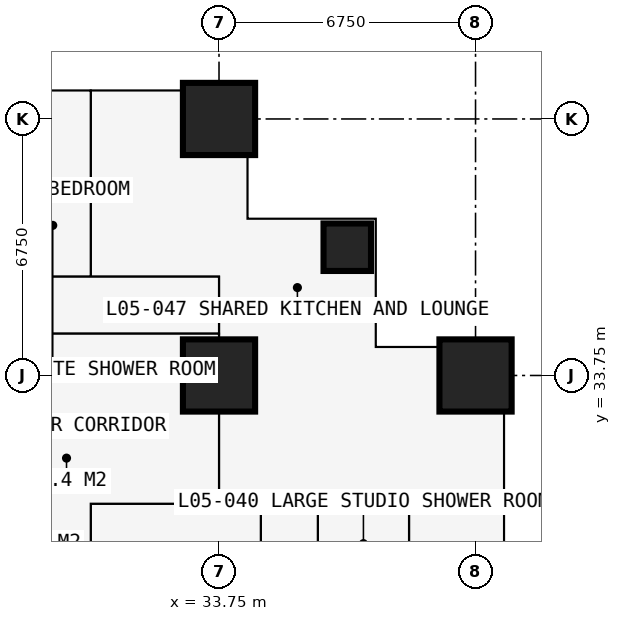
"""IFC4 building model, lengths in metres.
Left out: names, types, materials, properties, quantities, classifications, styles, units other than length and angle.
Written with IfcOpenShell. Run it as: python <this file> out.ifc"""

import sys

from ifc_helpers import new_model, si_unit, direction, frame, frame_2d, origin, origin_2d, place, context, subcontext, project, spatial, rectangle, extrude, element, fill, save


model = new_model("IFC4")
c1 = context("Model", 3, precision=1e-05, world=origin(), true_north=direction((0.0, 1.0)))
c2 = subcontext(c1, "Body", "Model", "MODEL_VIEW")
j1 = project(units=[si_unit("LENGTHUNIT", "METRE"), si_unit("PLANEANGLEUNIT", "RADIAN")], contexts=[c1])
p1 = place(None, origin())
s1 = spatial("IfcSite", under=j1, at=p1, CompositionType="ELEMENT")
p2 = place(p1, origin())
s2 = spatial("IfcBuilding", under=s1, at=p2, CompositionType="ELEMENT")
p3 = place(p2, frame((0.0, 0.0, 21.6)))
s3 = spatial("IfcBuildingStorey", under=s2, at=p3, CompositionType="ELEMENT", Elevation=21.6)
for number, where, z_axis, x_axis in (
    (1, (33.75, 33.75, 0.0), (0.0, 0.0, 1.0), (1.0, 0.0, 0.0)),
    (2, (33.75, 40.5, 0.0), (0.0, 0.0, 1.0), (1.0, 0.0, 0.0)),
):
    element("IfcColumn", number, at=place(p3, frame(where, z_axis=z_axis, x_axis=x_axis)), inside=s3, PredefinedType="COLUMN", context=c2, shape_type="SweptSolid", body=[
        extrude(rectangle(XDim=1.9, YDim=1.9, at=origin_2d()), origin(), (0.0, 0.0, 1.0), 3.6),
    ])
p4 = place(p3, frame((37.125, 37.125, 0.0), z_axis=(0.0, 0.0, 1.0), x_axis=(1.0, 0.0, 0.0)))
e3 = element("IfcColumn", 3, at=p4, inside=s3, PredefinedType="COLUMN", context=c2, shape_type="SweptSolid", body=[
    extrude(rectangle(XDim=1.25, YDim=1.25, at=origin_2d()), origin(), (0.0, 0.0, 1.0), 3.6),
])
p5 = place(p3, frame((40.5, 33.75, 0.0), z_axis=(0.0, 0.0, 1.0), x_axis=(1.0, 0.0, 0.0)))
e4 = element("IfcColumn", 4, at=p5, inside=s3, PredefinedType="COLUMN", context=c2, shape_type="SweptSolid", body=[
    extrude(rectangle(XDim=1.9, YDim=1.9, at=origin_2d()), origin(), (0.0, 0.0, 1.0), 3.6),
])
p6 = place(p3, frame((41.25, 34.5, 0.0), z_axis=(0.0, 0.0, 1.0), x_axis=(-1.0, 0.0, 0.0)))
e5 = element("IfcWall", 5, at=p6, inside=s3, PredefinedType="SOLIDWALL", context=c2, shape_type="SweptSolid", body=[
    extrude(rectangle(XDim=3.375, YDim=0.3, at=frame_2d((1.688, 0.0))), origin(), (0.0, 0.0, 1.0), 3.375),
])
p7 = place(p6, frame((1.857, 0.0, 0.9)))
e6 = element("IfcOpeningElement", 6, at=p7, cuts=e5, PredefinedType="OPENING", context=c2, shape_type="SweptSolid", body=[
    extrude(rectangle(XDim=1.2, YDim=1.8, at=frame_2d((0.6, 0.9))), frame((0.0, 0.16, 0.0), z_axis=(0.0, -1.0, 0.0), x_axis=(1.0, 0.0, 0.0)), (0.0, 0.0, 1.0), 0.32),
])
p8 = place(p3, frame((37.875, 34.5, 0.0), z_axis=(0.0, 0.0, 1.0), x_axis=(0.0, 1.0, 0.0)))
e7 = element("IfcWall", 7, at=p8, inside=s3, PredefinedType="SOLIDWALL", context=c2, shape_type="SweptSolid", body=[
    extrude(rectangle(XDim=3.375, YDim=0.3, at=frame_2d((1.688, 0.0))), origin(), (0.0, 0.0, 1.0), 3.375),
])
p9 = place(p8, frame((0.788, 0.0, 0.6)))
e8 = element("IfcOpeningElement", 8, at=p9, cuts=e7, PredefinedType="OPENING", context=c2, shape_type="SweptSolid", body=[
    extrude(rectangle(XDim=1.8, YDim=2.1, at=frame_2d((0.9, 1.05))), frame((0.0, 0.16, 0.0), z_axis=(0.0, -1.0, 0.0), x_axis=(1.0, 0.0, 0.0)), (0.0, 0.0, 1.0), 0.32),
])
p10 = place(p3, frame((37.875, 37.875, 0.0), z_axis=(0.0, 0.0, 1.0), x_axis=(-1.0, 0.0, 0.0)))
e9 = element("IfcWall", 9, at=p10, inside=s3, PredefinedType="SOLIDWALL", context=c2, shape_type="SweptSolid", body=[
    extrude(rectangle(XDim=3.375, YDim=0.3, at=frame_2d((1.688, 0.0))), origin(), (0.0, 0.0, 1.0), 3.375),
])
p11 = place(p10, frame((0.788, 0.0, 0.6)))
e10 = element("IfcOpeningElement", 10, at=p11, cuts=e9, PredefinedType="OPENING", context=c2, shape_type="SweptSolid", body=[
    extrude(rectangle(XDim=1.8, YDim=2.1, at=frame_2d((0.9, 1.05))), frame((0.0, 0.16, 0.0), z_axis=(0.0, -1.0, 0.0), x_axis=(1.0, 0.0, 0.0)), (0.0, 0.0, 1.0), 0.32),
])
p12 = place(p3, frame((34.5, 37.875, 0.0), z_axis=(0.0, 0.0, 1.0), x_axis=(0.0, 1.0, 0.0)))
e11 = element("IfcWall", 11, at=p12, inside=s3, PredefinedType="SOLIDWALL", context=c2, shape_type="SweptSolid", body=[
    extrude(rectangle(XDim=3.375, YDim=0.3, at=frame_2d((1.688, 0.0))), origin(), (0.0, 0.0, 1.0), 3.375),
])
p13 = place(p12, frame((0.317, 0.0, 0.9)))
e12 = element("IfcOpeningElement", 12, at=p13, cuts=e11, PredefinedType="OPENING", context=c2, shape_type="SweptSolid", body=[
    extrude(rectangle(XDim=1.2, YDim=1.8, at=frame_2d((0.6, 0.9))), frame((0.0, 0.16, 0.0), z_axis=(0.0, -1.0, 0.0), x_axis=(1.0, 0.0, 0.0)), (0.0, 0.0, 1.0), 0.32),
])
p14 = place(p3, frame((10.125, 36.35, 0.0), z_axis=(0.0, 0.0, 1.0), x_axis=(1.0, 0.0, 0.0)))
e13 = element("IfcWall", 13, at=p14, inside=s3, PredefinedType="PARTITIONING", context=c2, shape_type="SweptSolid", body=[
    extrude(rectangle(XDim=23.625, YDim=0.15, at=frame_2d((11.812, 0.0))), origin(), (0.0, 0.0, 1.0), 3.375),
])
p15 = place(p14, frame((21.45, 0.0, 0.0)))
e14 = element("IfcOpeningElement", 14, at=p15, cuts=e13, PredefinedType="OPENING", context=c2, shape_type="SweptSolid", body=[
    extrude(rectangle(XDim=1.0, YDim=2.2, at=frame_2d((0.5, 1.1))), frame((0.0, 0.085, 0.0), z_axis=(0.0, -1.0, 0.0), x_axis=(1.0, 0.0, 0.0)), (0.0, 0.0, 1.0), 0.17),
])
p16 = place(p14, frame((17.125, 0.0, 0.0)))
e15 = element("IfcOpeningElement", 15, at=p16, cuts=e13, PredefinedType="OPENING", context=c2, shape_type="SweptSolid", body=[
    extrude(rectangle(XDim=0.95, YDim=2.2, at=frame_2d((0.475, 1.1))), frame((0.0, 0.085, 0.0), z_axis=(0.0, -1.0, 0.0), x_axis=(1.0, 0.0, 0.0)), (0.0, 0.0, 1.0), 0.17),
])
p17 = place(p14, frame((13.7, 0.0, 0.0)))
e16 = element("IfcOpeningElement", 16, at=p17, cuts=e13, PredefinedType="OPENING", context=c2, shape_type="SweptSolid", body=[
    extrude(rectangle(XDim=0.95, YDim=2.2, at=frame_2d((0.475, 1.1))), frame((0.0, 0.085, 0.0), z_axis=(0.0, -1.0, 0.0), x_axis=(1.0, 0.0, 0.0)), (0.0, 0.0, 1.0), 0.17),
])
p18 = place(p14, frame((4.2, 0.0, 0.0)))
e17 = element("IfcOpeningElement", 17, at=p18, cuts=e13, PredefinedType="OPENING", context=c2, shape_type="SweptSolid", body=[
    extrude(rectangle(XDim=0.95, YDim=2.2, at=frame_2d((0.475, 1.1))), frame((0.0, 0.085, 0.0), z_axis=(0.0, -1.0, 0.0), x_axis=(1.0, 0.0, 0.0)), (0.0, 0.0, 1.0), 0.17),
])
p19 = place(p14, frame((10.95, 0.0, 0.0)))
e18 = element("IfcOpeningElement", 18, at=p19, cuts=e13, PredefinedType="OPENING", context=c2, shape_type="SweptSolid", body=[
    extrude(rectangle(XDim=0.95, YDim=2.2, at=frame_2d((0.475, 1.1))), frame((0.0, 0.085, 0.0), z_axis=(0.0, -1.0, 0.0), x_axis=(1.0, 0.0, 0.0)), (0.0, 0.0, 1.0), 0.17),
])
p20 = place(p3, frame((25.725, 34.85, 0.0), z_axis=(0.0, 0.0, 1.0), x_axis=(1.0, 0.0, 0.0)))
e19 = element("IfcWall", 19, at=p20, inside=s3, PredefinedType="PARTITIONING", context=c2, shape_type="SweptSolid", body=[
    extrude(rectangle(XDim=8.025, YDim=0.15, at=frame_2d((4.012, 0.0))), origin(), (0.0, 0.0, 1.0), 3.375),
])
p21 = place(p3, frame((28.375, 38.55, 0.0), z_axis=(0.0, 0.0, 1.0), x_axis=(1.0, 0.0, 0.0)))
e20 = element("IfcWall", 20, at=p21, inside=s3, PredefinedType="PARTITIONING", context=c2, shape_type="SweptSolid", body=[
    extrude(rectangle(XDim=2.0, YDim=0.1, at=frame_2d((1.0, 0.0))), origin(), (0.0, 0.0, 1.0), 3.375),
])
p22 = place(p3, frame((30.375, 29.2, 0.0), z_axis=(0.0, 0.0, 1.0), x_axis=(0.0, 1.0, 0.0)))
e21 = element("IfcWall", 21, at=p22, inside=s3, PredefinedType="PARTITIONING", context=c2, shape_type="SweptSolid", body=[
    extrude(rectangle(XDim=1.175, YDim=0.15, at=frame_2d((0.587, 0.0))), origin(), (0.0, 0.0, 1.0), 3.375),
])
p23 = place(p3, frame((30.375, 30.375, 0.0), z_axis=(0.0, 0.0, 1.0), x_axis=(1.0, 0.0, 0.0)))
e22 = element("IfcWall", 22, at=p23, inside=s3, PredefinedType="PARTITIONING", context=c2, shape_type="SweptSolid", body=[
    extrude(rectangle(XDim=10.859, YDim=0.15, at=frame_2d((5.429, 0.0))), origin(), (0.0, 0.0, 1.0), 3.375),
])
p24 = place(p3, frame((30.375, 36.35, 0.0), z_axis=(0.0, 0.0, 1.0), x_axis=(0.0, 1.0, 0.0)))
e23 = element("IfcWall", 23, at=p24, inside=s3, PredefinedType="PARTITIONING", context=c2, shape_type="SweptSolid", body=[
    extrude(rectangle(XDim=4.884, YDim=0.15, at=frame_2d((2.442, 0.0))), origin(), (0.0, 0.0, 1.0), 3.375),
])
p25 = place(p3, frame((33.75, 30.375, 0.0), z_axis=(0.0, 0.0, 1.0), x_axis=(0.0, 1.0, 0.0)))
e24 = element("IfcWall", 24, at=p25, inside=s3, PredefinedType="PARTITIONING", context=c2, shape_type="SweptSolid", body=[
    extrude(rectangle(XDim=5.975, YDim=0.15, at=frame_2d((2.988, 0.0))), origin(), (0.0, 0.0, 1.0), 2.877),
])
p26 = place(p3, frame((34.85, 12.55, 0.0), z_axis=(0.0, 0.0, 1.0), x_axis=(0.0, 1.0, 0.0)))
e25 = element("IfcWall", 25, at=p26, inside=s3, PredefinedType="PARTITIONING", context=c2, shape_type="SweptSolid", body=[
    extrude(rectangle(XDim=17.825, YDim=0.15, at=frame_2d((8.913, 0.0))), origin(), (0.0, 0.0, 1.0), 3.375),
])
p27 = place(p26, frame((8.65, 0.0, 0.0)))
e26 = element("IfcOpeningElement", 26, at=p27, cuts=e25, PredefinedType="OPENING", context=c2, shape_type="SweptSolid", body=[
    extrude(rectangle(XDim=0.95, YDim=2.2, at=frame_2d((0.475, 1.1))), frame((0.0, 0.085, 0.0), z_axis=(0.0, -1.0, 0.0), x_axis=(1.0, 0.0, 0.0)), (0.0, 0.0, 1.0), 0.17),
])
p28 = place(p3, frame((36.35, 6.75, 0.0), z_axis=(0.0, 0.0, 1.0), x_axis=(0.0, 1.0, 0.0)))
e27 = element("IfcWall", 27, at=p28, inside=s3, PredefinedType="PARTITIONING", context=c2, shape_type="SweptSolid", body=[
    extrude(rectangle(XDim=23.625, YDim=0.15, at=frame_2d((11.812, 0.0))), origin(), (0.0, 0.0, 1.0), 3.375),
])
p29 = place(p28, frame((0.2, 0.0, 0.0)))
e28 = element("IfcOpeningElement", 28, at=p29, cuts=e27, PredefinedType="OPENING", context=c2, shape_type="SweptSolid", body=[
    extrude(rectangle(XDim=0.95, YDim=2.2, at=frame_2d((0.475, 1.1))), frame((0.0, 0.085, 0.0), z_axis=(0.0, -1.0, 0.0), x_axis=(1.0, 0.0, 0.0)), (0.0, 0.0, 1.0), 0.17),
])
p30 = place(p28, frame((18.475, 0.0, 0.0)))
e29 = element("IfcOpeningElement", 29, at=p30, cuts=e27, PredefinedType="OPENING", context=c2, shape_type="SweptSolid", body=[
    extrude(rectangle(XDim=0.95, YDim=2.2, at=frame_2d((0.475, 1.1))), frame((0.0, 0.085, 0.0), z_axis=(0.0, -1.0, 0.0), x_axis=(1.0, 0.0, 0.0)), (0.0, 0.0, 1.0), 0.17),
])
p31 = place(p28, frame((11.725, 0.0, 0.0)))
e30 = element("IfcOpeningElement", 30, at=p31, cuts=e27, PredefinedType="OPENING", context=c2, shape_type="SweptSolid", body=[
    extrude(rectangle(XDim=0.95, YDim=2.2, at=frame_2d((0.475, 1.1))), frame((0.0, 0.085, 0.0), z_axis=(0.0, -1.0, 0.0), x_axis=(1.0, 0.0, 0.0)), (0.0, 0.0, 1.0), 0.17),
])
p32 = place(p28, frame((4.975, 0.0, 0.0)))
e31 = element("IfcOpeningElement", 31, at=p32, cuts=e27, PredefinedType="OPENING", context=c2, shape_type="SweptSolid", body=[
    extrude(rectangle(XDim=0.95, YDim=2.2, at=frame_2d((0.475, 1.1))), frame((0.0, 0.085, 0.0), z_axis=(0.0, -1.0, 0.0), x_axis=(1.0, 0.0, 0.0)), (0.0, 0.0, 1.0), 0.17),
])
p33 = place(p3, frame((38.75, 27.775, 0.0), z_axis=(0.0, 0.0, 1.0), x_axis=(0.0, 1.0, 0.0)))
e32 = element("IfcWall", 32, at=p33, inside=s3, PredefinedType="PARTITIONING", context=c2, shape_type="SweptSolid", body=[
    extrude(rectangle(XDim=2.6, YDim=0.1, at=frame_2d((1.3, 0.0))), origin(), (0.0, 0.0, 1.0), 3.375),
])
p34 = place(p33, frame((0.85, 0.0, 0.0)))
e33 = element("IfcOpeningElement", 33, at=p34, cuts=e32, PredefinedType="OPENING", context=c2, shape_type="SweptSolid", body=[
    extrude(rectangle(XDim=0.9, YDim=2.2, at=frame_2d((0.45, 1.1))), frame((0.0, 0.06, 0.0), z_axis=(0.0, -1.0, 0.0), x_axis=(1.0, 0.0, 0.0)), (0.0, 0.0, 1.0), 0.12),
])
p35 = place(p7, origin())
e34 = element("IfcWindow", 34, at=p35, inside=s3, PartitioningType="SINGLE_PANEL", PredefinedType="WINDOW", context=c2, shape_type="SweptSolid", body=[
    extrude(rectangle(XDim=1.2, YDim=1.8, at=frame_2d((0.6, 0.9))), frame((0.0, 0.03, 0.0), z_axis=(0.0, -1.0, 0.0), x_axis=(1.0, 0.0, 0.0)), (0.0, 0.0, 1.0), 0.06),
])
fill(e6, e34)
p36 = place(p9, origin())
e35 = element("IfcWindow", 35, at=p36, inside=s3, PartitioningType="SINGLE_PANEL", PredefinedType="WINDOW", context=c2, shape_type="SweptSolid", body=[
    extrude(rectangle(XDim=1.8, YDim=2.1, at=frame_2d((0.9, 1.05))), frame((0.0, 0.03, 0.0), z_axis=(0.0, -1.0, 0.0), x_axis=(1.0, 0.0, 0.0)), (0.0, 0.0, 1.0), 0.06),
])
fill(e8, e35)
p37 = place(p11, origin())
e36 = element("IfcWindow", 36, at=p37, inside=s3, PartitioningType="SINGLE_PANEL", PredefinedType="WINDOW", context=c2, shape_type="SweptSolid", body=[
    extrude(rectangle(XDim=1.8, YDim=2.1, at=frame_2d((0.9, 1.05))), frame((0.0, 0.03, 0.0), z_axis=(0.0, -1.0, 0.0), x_axis=(1.0, 0.0, 0.0)), (0.0, 0.0, 1.0), 0.06),
])
fill(e10, e36)
p38 = place(p13, origin())
e37 = element("IfcWindow", 37, at=p38, inside=s3, PartitioningType="SINGLE_PANEL", PredefinedType="WINDOW", context=c2, shape_type="SweptSolid", body=[
    extrude(rectangle(XDim=1.2, YDim=1.8, at=frame_2d((0.6, 0.9))), frame((0.0, 0.03, 0.0), z_axis=(0.0, -1.0, 0.0), x_axis=(1.0, 0.0, 0.0)), (0.0, 0.0, 1.0), 0.06),
])
fill(e12, e37)
p39 = place(p34, origin())
e38 = element("IfcDoor", 38, at=p39, inside=s3, OperationType="SINGLE_SWING_RIGHT", PredefinedType="DOOR", context=c2, shape_type="SweptSolid", body=[
    extrude(rectangle(XDim=0.9, YDim=2.2, at=frame_2d((0.45, 1.1))), frame((0.0, 0.025, 0.0), z_axis=(0.0, -1.0, 0.0), x_axis=(1.0, 0.0, 0.0)), (0.0, 0.0, 1.0), 0.05),
])
fill(e33, e38)
p40 = place(p15, origin())
e39 = element("IfcDoor", 39, at=p40, inside=s3, OperationType="SINGLE_SWING_LEFT", PredefinedType="DOOR", context=c2, shape_type="SweptSolid", body=[
    extrude(rectangle(XDim=1.0, YDim=2.2, at=frame_2d((0.5, 1.1))), frame((0.0, 0.025, 0.0), z_axis=(0.0, -1.0, 0.0), x_axis=(1.0, 0.0, 0.0)), (0.0, 0.0, 1.0), 0.05),
])
fill(e14, e39)
save(model, sys.argv[1])
